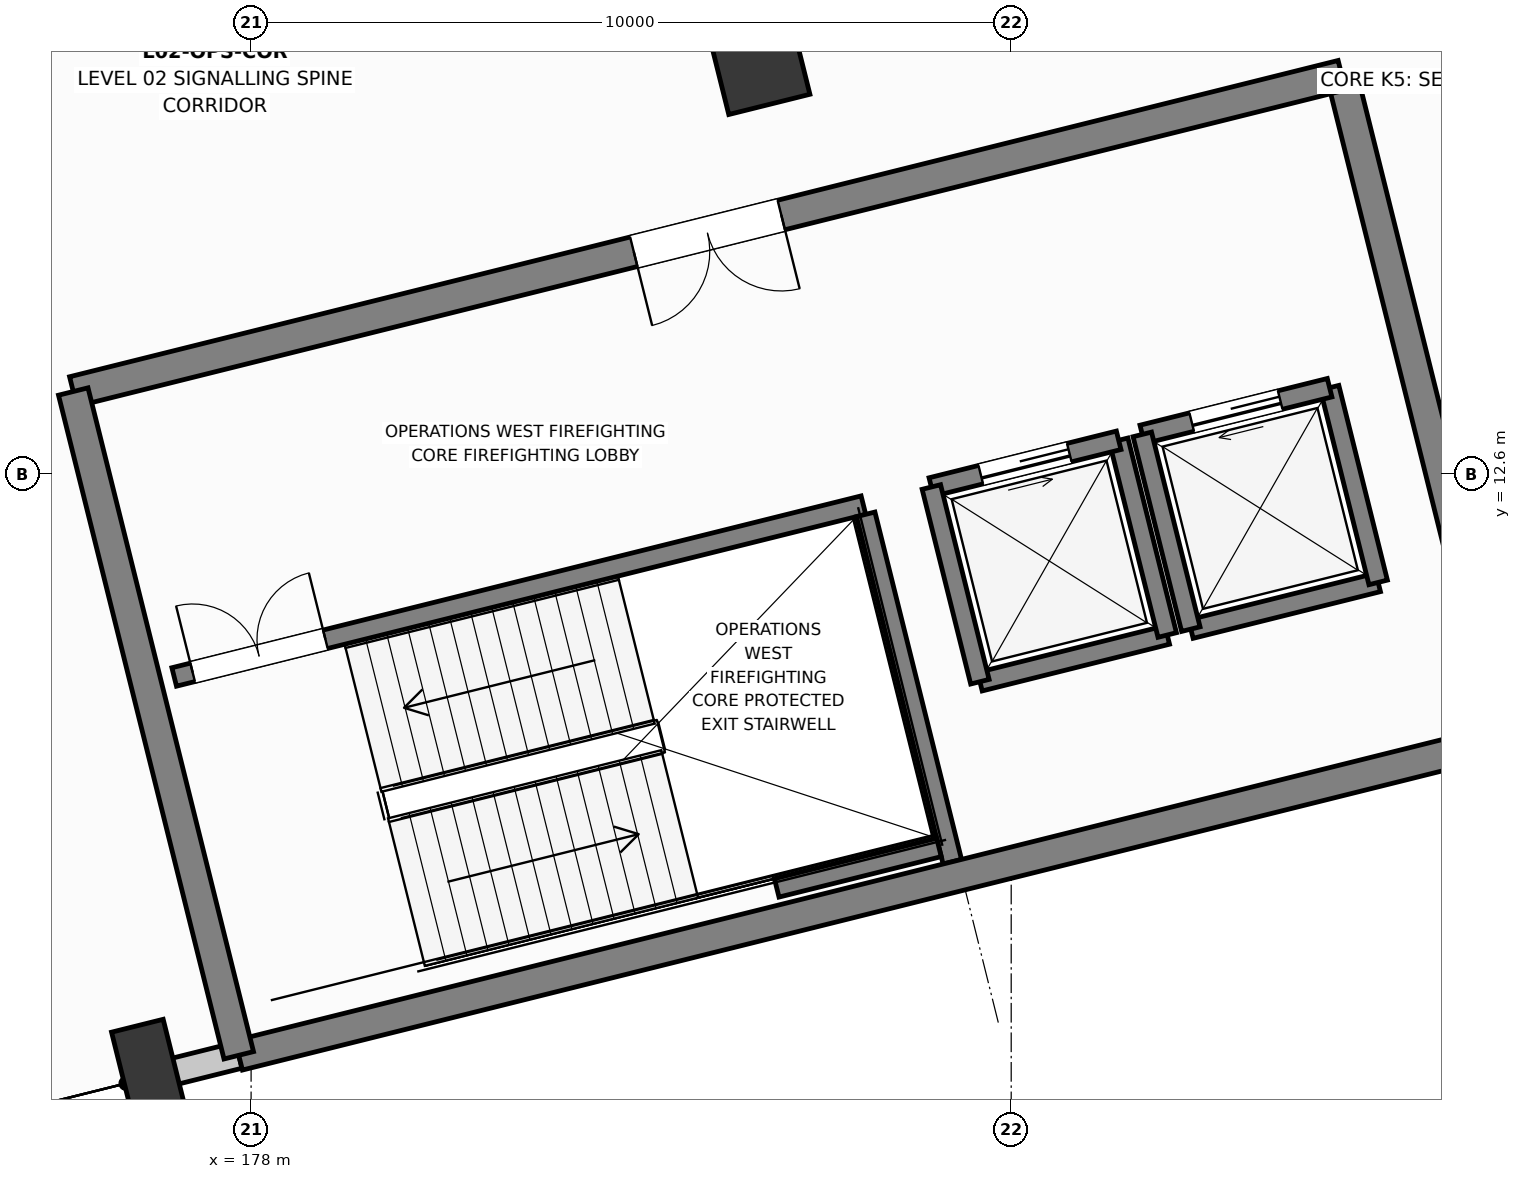
"""IFC4 building model, lengths in metres.
Left out: names, types, materials, properties, quantities, classifications, styles, units other than length and angle.
Written with IfcOpenShell. Run it as: python <this file> out.ifc"""

import sys

from ifc_helpers import new_model, si_unit, direction, frame, frame_2d, origin, origin_2d, place, context, subcontext, project, spatial, rectangle, extrude, element, fill, save


model = new_model("IFC4")
c1 = context("Model", 3, precision=1e-05, world=origin(), true_north=direction((0.0, 1.0)))
c2 = subcontext(c1, "Body", "Model", "MODEL_VIEW")
j1 = project(units=[si_unit("LENGTHUNIT", "METRE"), si_unit("PLANEANGLEUNIT", "RADIAN")], contexts=[c1])
p1 = place(None, origin())
s1 = spatial("IfcSite", under=j1, at=p1, CompositionType="ELEMENT")
p2 = place(p1, origin())
s2 = spatial("IfcBuilding", under=s1, at=p2, CompositionType="ELEMENT")
p3 = place(p2, frame((0.0, 0.0, 11.4)))
s3 = spatial("IfcBuildingStorey", under=s2, at=p3, CompositionType="ELEMENT", Elevation=11.4)
p4 = place(p3, frame((176.673, 4.661, 0.0), z_axis=(0.0, 0.0, 1.0), x_axis=(0.970295726276, 0.2419218956, 0.0)))
e1 = element("IfcColumn", 1, at=p4, inside=s3, PredefinedType="COLUMN", context=c2, shape_type="SweptSolid", body=[
    extrude(rectangle(XDim=0.7, YDim=1.4, at=origin_2d()), origin(), (0.0, 0.0, 1.0), 4.8),
])
p5 = place(p3, frame((184.685, 17.995, 0.0), z_axis=(0.0, 0.0, 1.0), x_axis=(0.970295726276, 0.2419218956, 0.0)))
e2 = element("IfcColumn", 2, at=p5, inside=s3, PredefinedType="COLUMN", context=c2, shape_type="SweptSolid", body=[
    extrude(rectangle(XDim=1.1, YDim=1.1, at=origin_2d()), origin(), (0.0, 0.0, 1.0), 4.8),
])
p6 = place(p3, frame((176.673, 4.661, 0.0), z_axis=(0.0, 0.0, 1.0), x_axis=(0.970294277425, 0.24192770655, 0.0)))
e3 = element("IfcWall", 3, at=p6, inside=s3, PredefinedType="STANDARD", context=c2, shape_type="SweptSolid", body=[
    extrude(rectangle(XDim=1.2, YDim=0.35, at=frame_2d((0.6, 0.0))), origin(), (0.0, 0.0, 1.0), 4.435),
])
p7 = place(p3, frame((187.588, 9.866, 0.0), z_axis=(0.0, 0.0, 1.0), x_axis=(0.97029284861, 0.241933436994, 0.0)))
e4 = element("IfcWall", 4, at=p7, inside=s3, PredefinedType="SOLIDWALL", context=c2, shape_type="SweptSolid", body=[
    extrude(rectangle(XDim=2.54, YDim=0.25, at=frame_2d((1.27, 0.0))), origin(), (0.0, 0.0, 1.0), 4.46),
])
p8 = place(p3, frame((190.053, 10.481, 0.0), z_axis=(0.0, 0.0, 1.0), x_axis=(-0.241938414856, 0.970291607413, 0.0)))
e5 = element("IfcWall", 5, at=p8, inside=s3, PredefinedType="SOLIDWALL", context=c2, shape_type="SweptSolid", body=[
    extrude(rectangle(XDim=2.64, YDim=0.25, at=frame_2d((1.32, 0.0))), origin(), (0.0, 0.0, 1.0), 4.46),
])
p9 = place(p3, frame((189.414, 13.042, 0.0), z_axis=(0.0, 0.0, 1.0), x_axis=(-0.97029284861, -0.241933436994, 0.0)))
e6 = element("IfcWall", 6, at=p9, inside=s3, PredefinedType="SOLIDWALL", context=c2, shape_type="SweptSolid", body=[
    extrude(rectangle(XDim=2.54, YDim=0.25, at=frame_2d((1.27, 0.0))), origin(), (0.0, 0.0, 1.0), 4.46),
])
p10 = place(p9, frame((0.67, 0.0, 0.0)))
e7 = element("IfcOpeningElement", 7, at=p10, cuts=e6, PredefinedType="OPENING", context=c2, shape_type="SweptSolid", body=[
    extrude(rectangle(XDim=1.2, YDim=2.2, at=frame_2d((0.6, 1.1))), frame((0.0, 0.135, 0.0), z_axis=(0.0, -1.0, 0.0), x_axis=(1.0, 0.0, 0.0)), (0.0, 0.0, 1.0), 0.27),
])
p11 = place(p3, frame((186.95, 12.428, 0.0), z_axis=(0.0, 0.0, 1.0), x_axis=(0.241938414856, -0.970291607413, 0.0)))
e8 = element("IfcWall", 8, at=p11, inside=s3, PredefinedType="SOLIDWALL", context=c2, shape_type="SweptSolid", body=[
    extrude(rectangle(XDim=2.64, YDim=0.25, at=frame_2d((1.32, 0.0))), origin(), (0.0, 0.0, 1.0), 4.46),
])
p12 = place(p3, frame((190.363, 10.558, 0.0), z_axis=(0.0, 0.0, 1.0), x_axis=(0.97029284861, 0.241933436994, 0.0)))
e9 = element("IfcWall", 9, at=p12, inside=s3, PredefinedType="SOLIDWALL", context=c2, shape_type="SweptSolid", body=[
    extrude(rectangle(XDim=2.54, YDim=0.25, at=frame_2d((1.27, 0.0))), origin(), (0.0, 0.0, 1.0), 4.46),
])
p13 = place(p3, frame((192.828, 11.173, 0.0), z_axis=(0.0, 0.0, 1.0), x_axis=(-0.241938414856, 0.970291607413, 0.0)))
e10 = element("IfcWall", 10, at=p13, inside=s3, PredefinedType="SOLIDWALL", context=c2, shape_type="SweptSolid", body=[
    extrude(rectangle(XDim=2.64, YDim=0.25, at=frame_2d((1.32, 0.0))), origin(), (0.0, 0.0, 1.0), 4.46),
])
p14 = place(p3, frame((192.189, 13.734, 0.0), z_axis=(0.0, 0.0, 1.0), x_axis=(-0.97029284861, -0.241933436994, 0.0)))
e11 = element("IfcWall", 11, at=p14, inside=s3, PredefinedType="SOLIDWALL", context=c2, shape_type="SweptSolid", body=[
    extrude(rectangle(XDim=2.54, YDim=0.25, at=frame_2d((1.27, 0.0))), origin(), (0.0, 0.0, 1.0), 4.46),
])
p15 = place(p14, frame((0.67, 0.0, 0.0)))
e12 = element("IfcOpeningElement", 12, at=p15, cuts=e11, PredefinedType="OPENING", context=c2, shape_type="SweptSolid", body=[
    extrude(rectangle(XDim=1.2, YDim=2.2, at=frame_2d((0.6, 1.1))), frame((0.0, 0.135, 0.0), z_axis=(0.0, -1.0, 0.0), x_axis=(1.0, 0.0, 0.0)), (0.0, 0.0, 1.0), 0.27),
])
p16 = place(p3, frame((189.725, 13.12, 0.0), z_axis=(0.0, 0.0, 1.0), x_axis=(0.241938414856, -0.970291607413, 0.0)))
e13 = element("IfcWall", 13, at=p16, inside=s3, PredefinedType="SOLIDWALL", context=c2, shape_type="SweptSolid", body=[
    extrude(rectangle(XDim=2.64, YDim=0.25, at=frame_2d((1.32, 0.0))), origin(), (0.0, 0.0, 1.0), 4.46),
])
p17 = place(p3, frame((176.988, 9.929, 0.0), z_axis=(0.0, 0.0, 1.0), x_axis=(0.970297151331, 0.241916179943, 0.0)))
e14 = element("IfcWall", 14, at=p17, inside=s3, PredefinedType="SOLIDWALL", context=c2, shape_type="SweptSolid", body=[
    extrude(rectangle(XDim=9.345, YDim=0.25, at=frame_2d((4.673, 0.0))), origin(), (0.0, 0.0, 1.0), 4.43),
])
p18 = place(p17, frame((0.25, 0.0, 0.0)))
e15 = element("IfcOpeningElement", 15, at=p18, cuts=e14, PredefinedType="OPENING", context=c2, shape_type="SweptSolid", body=[
    extrude(rectangle(XDim=1.8, YDim=2.25, at=frame_2d((0.9, 1.125))), frame((0.0, 0.135, 0.0), z_axis=(0.0, -1.0, 0.0), x_axis=(1.0, 0.0, 0.0)), (0.0, 0.0, 1.0), 0.27),
])
p19 = place(p3, frame((187.225, 7.498, 0.0), z_axis=(0.0, 0.0, 1.0), x_axis=(-0.241911120435, 0.970298412763, 0.0)))
e16 = element("IfcWall", 16, at=p19, inside=s3, PredefinedType="SOLIDWALL", context=c2, shape_type="SweptSolid", body=[
    extrude(rectangle(XDim=4.71, YDim=0.25, at=frame_2d((2.355, 0.0))), origin(), (0.0, 0.0, 1.0), 4.43),
])
p20 = place(p3, frame((184.915, 7.154, 0.0), z_axis=(0.0, 0.0, 1.0), x_axis=(0.97029738597, 0.241915238833, 0.0)))
e17 = element("IfcWall", 17, at=p20, inside=s3, PredefinedType="SOLIDWALL", context=c2, shape_type="SweptSolid", body=[
    extrude(rectangle(XDim=2.2, YDim=0.25, at=frame_2d((1.1, 0.0))), origin(), (0.0, 0.0, 1.0), 4.43),
])
p21 = place(p3, frame((177.838, 4.951, 0.0), z_axis=(0.0, 0.0, 1.0), x_axis=(0.970295179998, 0.241924086589, 0.0)))
e18 = element("IfcWall", 18, at=p21, inside=s3, PredefinedType="SHEAR", context=c2, shape_type="SweptSolid", body=[
    extrude(rectangle(XDim=17.2, YDim=0.4, at=frame_2d((8.6, 0.0))), origin(), (0.0, 0.0, 1.0), 4.46),
])
p22 = place(p3, frame((194.527, 9.113, 0.0), z_axis=(0.0, 0.0, 1.0), x_axis=(-0.241923808098, 0.970295249435, 0.0)))
e19 = element("IfcWall", 19, at=p22, inside=s3, PredefinedType="SHEAR", context=c2, shape_type="SweptSolid", body=[
    extrude(rectangle(XDim=9.0, YDim=0.4, at=frame_2d((4.5, 0.0))), origin(), (0.0, 0.0, 1.0), 4.46),
])
p23 = place(p3, frame((192.349, 17.845, 0.0), z_axis=(0.0, 0.0, 1.0), x_axis=(-0.970296544738, -0.241918612906, 0.0)))
e20 = element("IfcWall", 20, at=p23, inside=s3, PredefinedType="SHEAR", context=c2, shape_type="SweptSolid", body=[
    extrude(rectangle(XDim=17.2, YDim=0.4, at=frame_2d((8.6, 0.0))), origin(), (0.0, 0.0, 1.0), 4.46),
])
p24 = place(p23, frame((7.6, 0.0, 0.0)))
e21 = element("IfcOpeningElement", 21, at=p24, cuts=e20, PredefinedType="OPENING", context=c2, shape_type="SweptSolid", body=[
    extrude(rectangle(XDim=2.0, YDim=2.3, at=frame_2d((1.0, 1.15))), frame((0.0, 0.21, 0.0), z_axis=(0.0, -1.0, 0.0), x_axis=(1.0, 0.0, 0.0)), (0.0, 0.0, 1.0), 0.42),
])
p25 = place(p3, frame((175.66, 13.684, 0.0), z_axis=(0.0, 0.0, 1.0), x_axis=(0.241921199913, -0.97029589973, 0.0)))
e22 = element("IfcWall", 22, at=p25, inside=s3, PredefinedType="SHEAR", context=c2, shape_type="SweptSolid", body=[
    extrude(rectangle(XDim=9.0, YDim=0.4, at=frame_2d((4.5, 0.0))), origin(), (0.0, 0.0, 1.0), 4.46),
])
p26 = place(p3, frame((202.6, 27.409, 0.0), z_axis=(0.0, 0.0, 1.0), x_axis=(-0.970295311026, -0.241923561072, 0.0)))
e23 = element("IfcWall", 23, at=p26, inside=s3, PredefinedType="PARTITIONING", context=c2, shape_type="SweptSolid", body=[
    extrude(rectangle(XDim=41.06, YDim=0.2, at=frame_2d((20.53, 0.0))), origin(), (0.0, 0.0, 1.0), 3.225),
])
p27 = place(p26, frame((19.98, 0.0, 0.0)))
e24 = element("IfcOpeningElement", 24, at=p27, cuts=e23, PredefinedType="OPENING", context=c2, shape_type="SweptSolid", body=[
    extrude(rectangle(XDim=1.1, YDim=2.2, at=frame_2d((0.55, 1.1))), frame((0.0, 0.11, 0.0), z_axis=(0.0, -1.0, 0.0), x_axis=(1.0, 0.0, 0.0)), (0.0, 0.0, 1.0), 0.22),
])
p28 = place(p10, origin())
e25 = element("IfcDoor", 25, at=p28, inside=s3, OperationType="SLIDING_TO_LEFT", PredefinedType="DOOR", context=c2, shape_type="SweptSolid", body=[
    extrude(rectangle(XDim=1.2, YDim=2.2, at=frame_2d((0.6, 1.1))), frame((0.0, 0.025, 0.0), z_axis=(0.0, -1.0, 0.0), x_axis=(1.0, 0.0, 0.0)), (0.0, 0.0, 1.0), 0.05),
])
fill(e7, e25)
p29 = place(p15, origin())
e26 = element("IfcDoor", 26, at=p29, inside=s3, OperationType="SLIDING_TO_RIGHT", PredefinedType="DOOR", context=c2, shape_type="SweptSolid", body=[
    extrude(rectangle(XDim=1.2, YDim=2.2, at=frame_2d((0.6, 1.1))), frame((0.0, 0.025, 0.0), z_axis=(0.0, -1.0, 0.0), x_axis=(1.0, 0.0, 0.0)), (0.0, 0.0, 1.0), 0.05),
])
fill(e12, e26)
p30 = place(p18, origin())
e27 = element("IfcDoor", 27, at=p30, inside=s3, OperationType="DOUBLE_DOOR_SINGLE_SWING", PredefinedType="DOOR", context=c2, shape_type="SweptSolid", body=[
    extrude(rectangle(XDim=1.8, YDim=2.25, at=frame_2d((0.9, 1.125))), frame((0.0, 0.025, 0.0), z_axis=(0.0, -1.0, 0.0), x_axis=(1.0, 0.0, 0.0)), (0.0, 0.0, 1.0), 0.05),
])
fill(e15, e27)
p31 = place(p24, origin())
e28 = element("IfcDoor", 28, at=p31, inside=s3, OperationType="DOUBLE_DOOR_SINGLE_SWING", PredefinedType="DOOR", context=c2, shape_type="SweptSolid", body=[
    extrude(rectangle(XDim=2.0, YDim=2.3, at=frame_2d((1.0, 1.15))), frame((0.0, 0.025, 0.0), z_axis=(0.0, -1.0, 0.0), x_axis=(1.0, 0.0, 0.0)), (0.0, 0.0, 1.0), 0.05),
])
fill(e21, e28)
save(model, sys.argv[1])
